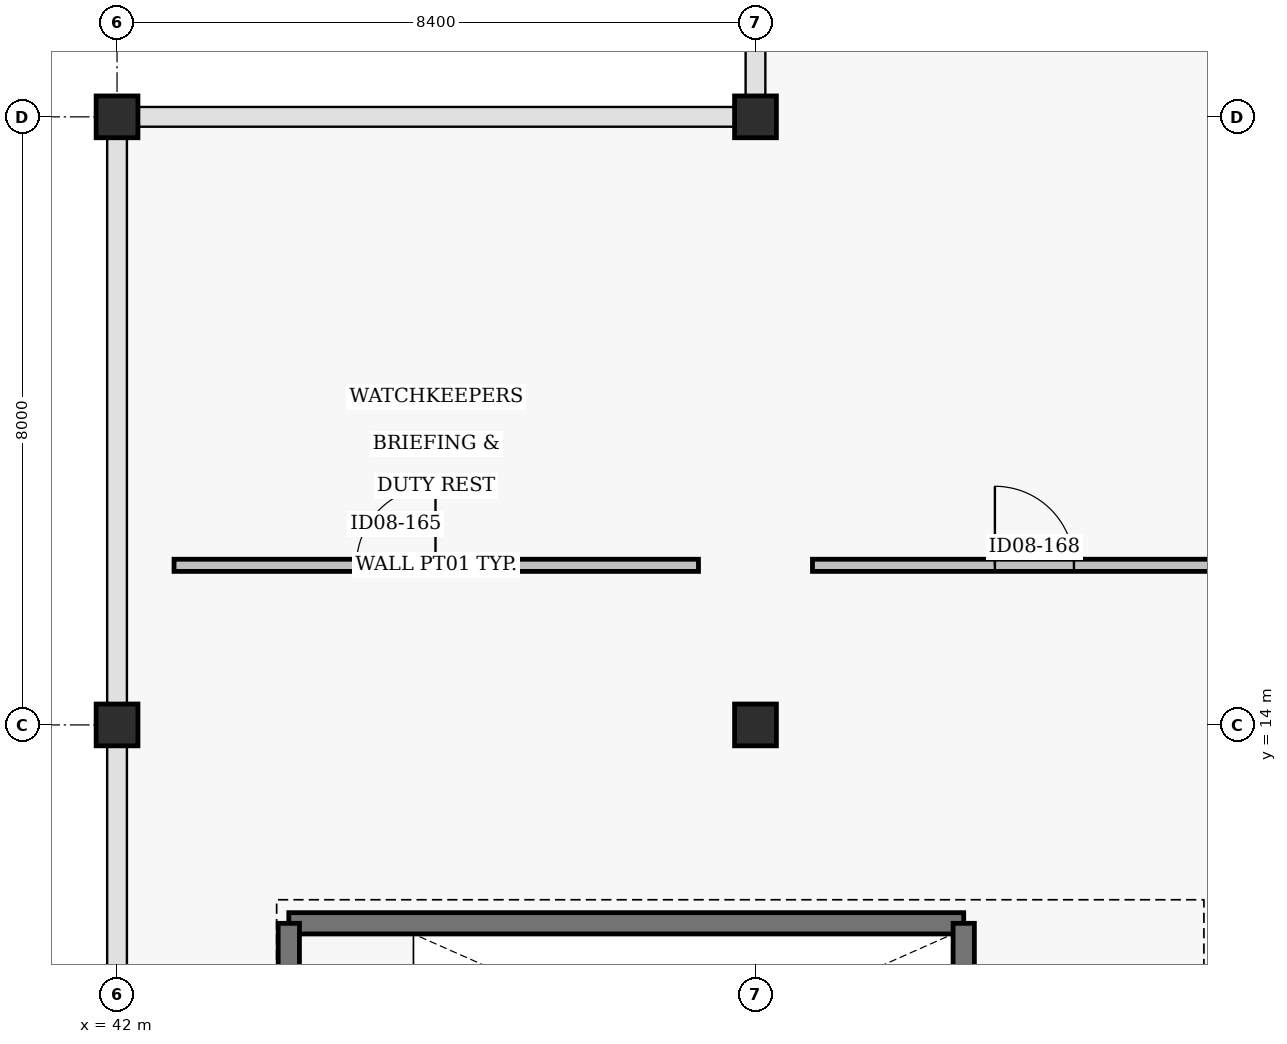
"""IFC4 building model, lengths in metres.
Left out: names, types, materials, properties, quantities, classifications, styles, units other than length and angle.
Written with IfcOpenShell. Run it as: python <this file> out.ifc"""

import sys

from ifc_helpers import new_model, si_unit, direction, frame, frame_2d, origin, origin_2d, place, context, subcontext, project, spatial, rectangle, extrude, element, fill, save


model = new_model("IFC4")
c1 = context("Model", 3, precision=1e-05, world=origin(), true_north=direction((0.0, 1.0)))
c2 = subcontext(c1, "Body", "Model", "MODEL_VIEW")
j1 = project(units=[si_unit("LENGTHUNIT", "METRE"), si_unit("PLANEANGLEUNIT", "RADIAN")], contexts=[c1])
p1 = place(None, origin())
s1 = spatial("IfcSite", under=j1, at=p1, CompositionType="ELEMENT")
p2 = place(p1, origin())
s2 = spatial("IfcBuilding", under=s1, at=p2, CompositionType="ELEMENT")
p3 = place(p2, frame((0.0, 0.0, 16.32)))
s3 = spatial("IfcBuildingStorey", under=s2, at=p3, CompositionType="ELEMENT", Elevation=16.32)
for number, where, z_axis, x_axis in (
    (1, (42.0, 14.0, 0.0), (0.0, 0.0, 1.0), (1.0, 0.0, 0.0)),
    (2, (42.0, 22.0, 0.0), (0.0, 0.0, 1.0), (1.0, 0.0, 0.0)),
    (3, (50.4, 14.0, 0.0), (0.0, 0.0, 1.0), (1.0, 0.0, 0.0)),
    (4, (50.4, 22.0, 0.0), (0.0, 0.0, 1.0), (1.0, 0.0, 0.0)),
):
    element("IfcColumn", number, at=place(p3, frame(where, z_axis=z_axis, x_axis=x_axis)), inside=s3, PredefinedType="COLUMN", context=c2, shape_type="SweptSolid", body=[
        extrude(rectangle(XDim=0.55, YDim=0.55, at=origin_2d()), origin(), (0.0, 0.0, 1.0), 3.2),
    ])
p4 = place(p3, frame((44.26, 11.39, 0.0), z_axis=(0.0, 0.0, 1.0), x_axis=(1.0, 0.0, 0.0)))
e5 = element("IfcWall", 5, at=p4, inside=s3, PredefinedType="SHEAR", context=c2, shape_type="SweptSolid", body=[
    extrude(rectangle(XDim=8.88, YDim=0.28, at=frame_2d((4.44, 0.0))), origin(), (0.0, 0.0, 1.0), 3.2),
])
p5 = place(p3, frame((44.26, 11.39, 0.0), z_axis=(0.0, 0.0, 1.0), x_axis=(0.0, -1.0, 0.0)))
e6 = element("IfcWall", 6, at=p5, inside=s3, PredefinedType="SHEAR", context=c2, shape_type="SweptSolid", body=[
    extrude(rectangle(XDim=3.43, YDim=0.28, at=frame_2d((1.715, 0.0))), origin(), (0.0, 0.0, 1.0), 3.2),
])
p6 = place(p5, frame((1.035, 0.0, 0.0)))
e7 = element("IfcOpeningElement", 7, at=p6, cuts=e6, PredefinedType="OPENING", context=c2, shape_type="SweptSolid", body=[
    extrude(rectangle(XDim=1.36, YDim=2.15, at=frame_2d((0.68, 1.075))), frame((0.0, 0.15, 0.0), z_axis=(0.0, -1.0, 0.0), x_axis=(1.0, 0.0, 0.0)), (0.0, 0.0, 1.0), 0.3),
])
p7 = place(p3, frame((53.14, 7.96, 0.0), z_axis=(0.0, 0.0, 1.0), x_axis=(0.0, 1.0, 0.0)))
e8 = element("IfcWall", 8, at=p7, inside=s3, PredefinedType="SHEAR", context=c2, shape_type="SweptSolid", body=[
    extrude(rectangle(XDim=3.43, YDim=0.28, at=frame_2d((1.715, 0.0))), origin(), (0.0, 0.0, 1.0), 3.2),
])
p8 = place(p3, frame((42.75, 16.1, 0.0), z_axis=(0.0, 0.0, 1.0), x_axis=(1.0, 0.0, 0.0)))
e9 = element("IfcWall", 9, at=p8, inside=s3, PredefinedType="PARTITIONING", context=c2, shape_type="SweptSolid", body=[
    extrude(rectangle(XDim=6.9, YDim=0.16, at=frame_2d((3.45, 0.0))), origin(), (0.0, 0.0, 1.0), 2.5),
])
p9 = place(p8, frame((2.4, 0.0, 0.0)))
e10 = element("IfcOpeningElement", 10, at=p9, cuts=e9, PredefinedType="OPENING", context=c2, shape_type="SweptSolid", body=[
    extrude(rectangle(XDim=1.04, YDim=2.14, at=frame_2d((0.52, 1.07))), frame((0.0, 0.09, 0.0), z_axis=(0.0, -1.0, 0.0), x_axis=(1.0, 0.0, 0.0)), (0.0, 0.0, 1.0), 0.18),
])
p10 = place(p3, frame((51.15, 16.1, 0.0), z_axis=(0.0, 0.0, 1.0), x_axis=(1.0, 0.0, 0.0)))
e11 = element("IfcWall", 11, at=p10, inside=s3, PredefinedType="PARTITIONING", context=c2, shape_type="SweptSolid", body=[
    extrude(rectangle(XDim=6.9, YDim=0.16, at=frame_2d((3.45, 0.0))), origin(), (0.0, 0.0, 1.0), 2.5),
])
p11 = place(p10, frame((2.4, 0.0, 0.0)))
e12 = element("IfcOpeningElement", 12, at=p11, cuts=e11, PredefinedType="OPENING", context=c2, shape_type="SweptSolid", body=[
    extrude(rectangle(XDim=1.04, YDim=2.14, at=frame_2d((0.52, 1.07))), frame((0.0, 0.09, 0.0), z_axis=(0.0, -1.0, 0.0), x_axis=(1.0, 0.0, 0.0)), (0.0, 0.0, 1.0), 0.18),
])
p12 = place(p9, origin())
e13 = element("IfcDoor", 13, at=p12, inside=s3, OperationType="SINGLE_SWING_RIGHT", PredefinedType="DOOR", context=c2, shape_type="SweptSolid", body=[
    extrude(rectangle(XDim=1.04, YDim=2.14, at=frame_2d((0.52, 1.07))), frame((0.0, 0.025, 0.0), z_axis=(0.0, -1.0, 0.0), x_axis=(1.0, 0.0, 0.0)), (0.0, 0.0, 1.0), 0.05),
])
fill(e10, e13)
p13 = place(p11, origin())
e14 = element("IfcDoor", 14, at=p13, inside=s3, OperationType="SINGLE_SWING_LEFT", PredefinedType="DOOR", context=c2, shape_type="SweptSolid", body=[
    extrude(rectangle(XDim=1.04, YDim=2.14, at=frame_2d((0.52, 1.07))), frame((0.0, 0.025, 0.0), z_axis=(0.0, -1.0, 0.0), x_axis=(1.0, 0.0, 0.0)), (0.0, 0.0, 1.0), 0.05),
])
fill(e12, e14)
save(model, sys.argv[1])
